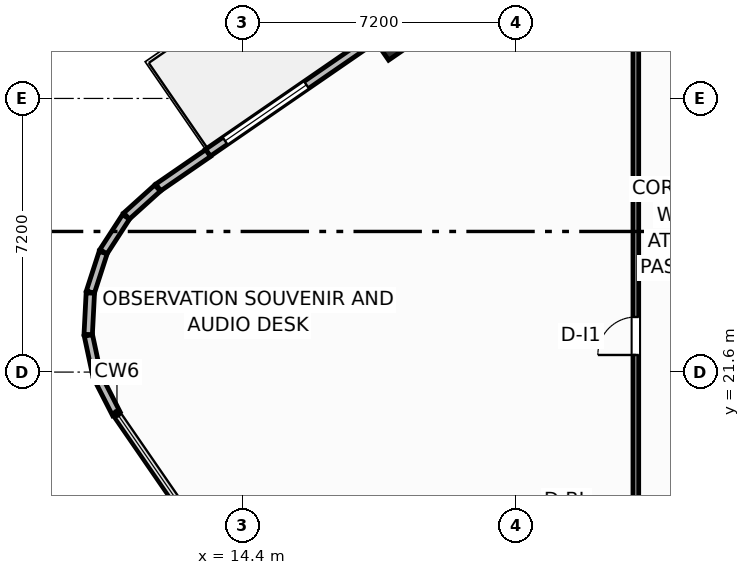
"""IFC4 building model, lengths in metres.
Left out: names, types, materials, properties, quantities, classifications, styles, units other than length and angle.
Written with IfcOpenShell. Run it as: python <this file> out.ifc"""

import sys

from ifc_helpers import new_model, si_unit, direction, frame, frame_2d, origin, origin_2d, place, context, subcontext, project, spatial, rectangle, i_section, extrude, element, fill, save


model = new_model("IFC4")
c1 = context("Model", 3, precision=1e-05, world=origin(), true_north=direction((0.0, 1.0)))
c2 = subcontext(c1, "Body", "Model", "MODEL_VIEW")
j1 = project(units=[si_unit("LENGTHUNIT", "METRE"), si_unit("PLANEANGLEUNIT", "RADIAN")], contexts=[c1])
p1 = place(None, origin())
s1 = spatial("IfcSite", under=j1, at=p1, CompositionType="ELEMENT")
p2 = place(p1, origin())
s2 = spatial("IfcBuilding", under=s1, at=p2, CompositionType="ELEMENT")
p3 = place(p2, frame((0.0, 0.0, 296.3)))
s3 = spatial("IfcBuildingStorey", under=s2, at=p3, CompositionType="ELEMENT", Elevation=296.3)
p4 = place(p3, frame((18.296, 30.086, -0.32), z_axis=(0.0, 0.0, 1.0), x_axis=(0.823532597628, 0.567268949127, 0.0)))
e1 = element("IfcColumn", 1, at=p4, inside=s3, PredefinedType="COLUMN", context=c2, shape_type="SweptSolid", body=[
    extrude(i_section(OverallWidth=0.401, OverallDepth=0.399, WebThickness=0.025, FlangeThickness=0.04, FilletRadius=0.022, at=origin_2d()), origin(), (0.0, 0.0, 1.0), 5.12),
])
p5 = place(p3, frame((13.489, 27.37, 0.0), z_axis=(0.0, 0.0, 1.0), x_axis=(0.823532439547, 0.567269178622, 0.0)))
e2 = element("IfcWall", 2, at=p5, inside=s3, PredefinedType="SOLIDWALL", context=c2, shape_type="SweptSolid", body=[
    extrude(rectangle(XDim=40.0, YDim=0.22, at=frame_2d((20.0, 0.0))), origin(), (0.0, 0.0, 1.0), 3.83),
])
p6 = place(p5, frame((25.598, 0.0, 0.0)))
e3 = element("IfcOpeningElement", 3, at=p6, cuts=e2, PredefinedType="OPENING", context=c2, shape_type="SweptSolid", body=[
    extrude(rectangle(XDim=1.95, YDim=2.35, at=frame_2d((0.975, 1.175))), frame((0.0, 0.12, 0.0), z_axis=(0.0, -1.0, 0.0), x_axis=(1.0, 0.0, 0.0)), (0.0, 0.0, 1.0), 0.24),
])
p7 = place(p5, frame((0.55, 0.0, 0.75)))
e4 = element("IfcOpeningElement", 4, at=p7, cuts=e2, PredefinedType="OPENING", context=c2, shape_type="SweptSolid", body=[
    extrude(rectangle(XDim=2.6, YDim=2.0, at=frame_2d((1.3, 1.0))), frame((0.0, 0.12, 0.0), z_axis=(0.0, -1.0, 0.0), x_axis=(1.0, 0.0, 0.0)), (0.0, 0.0, 1.0), 0.24),
])
p8 = place(p5, frame((36.85, 0.0, 0.75)))
e5 = element("IfcOpeningElement", 5, at=p8, cuts=e2, PredefinedType="OPENING", context=c2, shape_type="SweptSolid", body=[
    extrude(rectangle(XDim=2.6, YDim=2.0, at=frame_2d((1.3, 1.0))), frame((0.0, 0.12, 0.0), z_axis=(0.0, -1.0, 0.0), x_axis=(1.0, 0.0, 0.0)), (0.0, 0.0, 1.0), 0.24),
])
p9 = place(p3, frame((13.494, 27.362, 0.0), z_axis=(0.0, 0.0, 1.0), x_axis=(-0.823459838426, -0.567374562789, 0.0)))
e6 = element("IfcWall", 6, at=p9, inside=s3, PredefinedType="SOLIDWALL", context=c2, shape_type="SweptSolid", body=[
    extrude(rectangle(XDim=1.592, YDim=0.22, at=frame_2d((0.796, 0.0))), origin(), (0.0, 0.0, 1.0), 3.83),
])
p10 = place(p3, frame((12.165, 26.442, 0.0), z_axis=(0.0, 0.0, 1.0), x_axis=(-0.742465815116, -0.669883955163, 0.0)))
e7 = element("IfcWall", 7, at=p10, inside=s3, PredefinedType="SOLIDWALL", context=c2, shape_type="SweptSolid", body=[
    extrude(rectangle(XDim=1.1, YDim=0.22, at=frame_2d((0.55, 0.0))), origin(), (0.0, 0.0, 1.0), 3.83),
])
for number, where, z_axis, x_axis in (
    (8, (11.334, 25.684, 0.0), (0.0, 0.0, 1.0), (-0.544, -0.839, 0.0)),
    (9, (10.733, 24.744, 0.0), (0.0, 0.0, 1.0), (-0.308, -0.951, 0.0)),
    (10, (10.395, 23.68, 0.0), (0.0, 0.0, 1.0), (-0.051, -0.999, 0.0)),
    (11, (10.344, 22.565, 0.0), (0.0, 0.0, 1.0), (0.209, -0.978, 0.0)),
):
    element("IfcWall", number, at=place(p3, frame(where, z_axis=z_axis, x_axis=x_axis)), inside=s3, PredefinedType="SOLIDWALL", context=c2, shape_type="SweptSolid", body=[
        extrude(rectangle(XDim=1.092, YDim=0.22, at=frame_2d((0.546, 0.0))), origin(), (0.0, 0.0, 1.0), 3.83),
    ])
p11 = place(p3, frame((10.584, 21.475, 0.0), z_axis=(0.0, 0.0, 1.0), x_axis=(0.454886551107, -0.890549395386, 0.0)))
e12 = element("IfcWall", 12, at=p11, inside=s3, PredefinedType="SOLIDWALL", context=c2, shape_type="SweptSolid", body=[
    extrude(rectangle(XDim=1.092, YDim=0.22, at=frame_2d((0.546, 0.0))), origin(), (0.0, 0.0, 1.0), 3.83),
])
p12 = place(p3, frame((24.75, 16.85, 0.0), z_axis=(0.0, 0.0, 1.0), x_axis=(0.0, 1.0, 0.0)))
e13 = element("IfcWall", 13, at=p12, inside=s3, PredefinedType="PARTITIONING", context=c2, shape_type="SweptSolid", body=[
    extrude(rectangle(XDim=18.241, YDim=0.15, at=frame_2d((9.12, 0.0))), origin(), (0.0, 0.0, 1.0), 4.55),
])
p13 = place(p12, frame((5.2, 0.0, 0.0)))
e14 = element("IfcOpeningElement", 14, at=p13, cuts=e13, PredefinedType="OPENING", context=c2, shape_type="SweptSolid", body=[
    extrude(rectangle(XDim=1.0, YDim=2.05, at=frame_2d((0.5, 1.025))), frame((0.0, 0.085, 0.0), z_axis=(0.0, -1.0, 0.0), x_axis=(1.0, 0.0, 0.0)), (0.0, 0.0, 1.0), 0.17),
])
p14 = place(p7, origin())
e15 = element("IfcWindow", 15, at=p14, inside=s3, PartitioningType="SINGLE_PANEL", PredefinedType="WINDOW", context=c2, shape_type="SweptSolid", body=[
    extrude(rectangle(XDim=2.6, YDim=2.0, at=frame_2d((1.3, 1.0))), frame((0.0, 0.03, 0.0), z_axis=(0.0, -1.0, 0.0), x_axis=(1.0, 0.0, 0.0)), (0.0, 0.0, 1.0), 0.06),
])
fill(e4, e15)
p15 = place(p13, origin())
e16 = element("IfcDoor", 16, at=p15, inside=s3, OperationType="SINGLE_SWING_LEFT", PredefinedType="DOOR", context=c2, shape_type="SweptSolid", body=[
    extrude(rectangle(XDim=1.0, YDim=2.05, at=frame_2d((0.5, 1.025))), frame((0.0, 0.025, 0.0), z_axis=(0.0, -1.0, 0.0), x_axis=(1.0, 0.0, 0.0)), (0.0, 0.0, 1.0), 0.05),
])
fill(e14, e16)
save(model, sys.argv[1])
